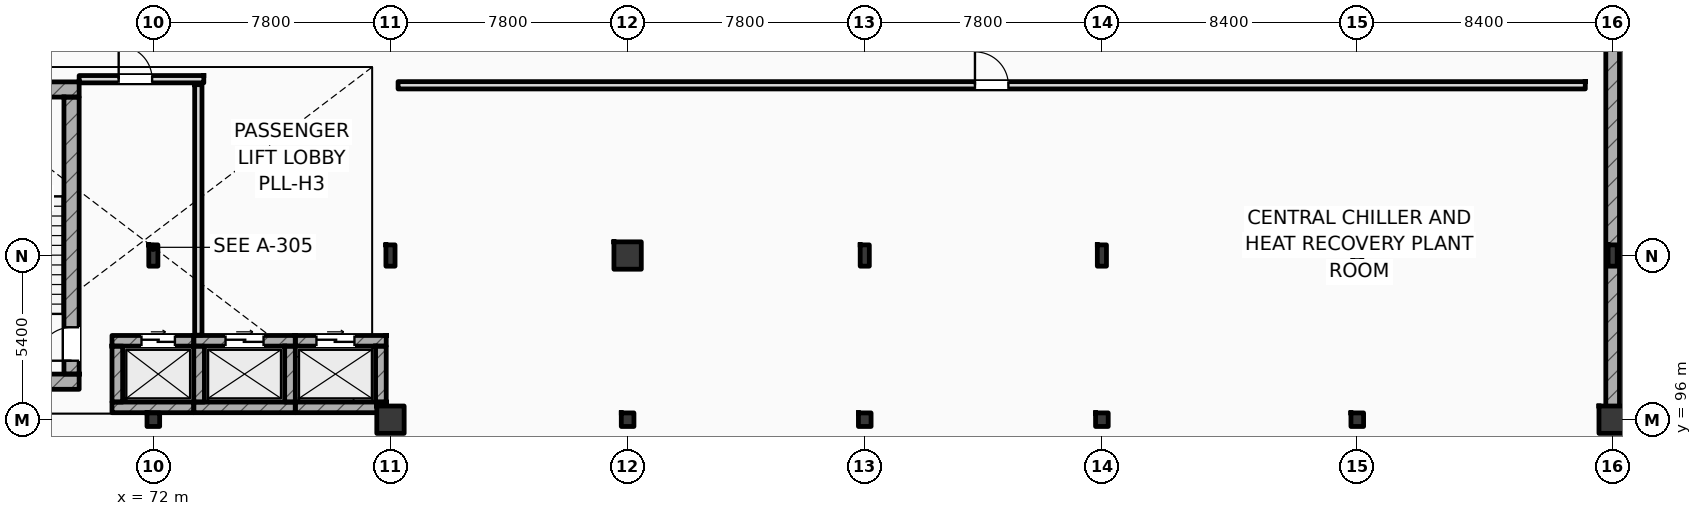
"""IFC4 building model, lengths in metres.
Left out: names, types, materials, properties, quantities, classifications, styles, units other than length and angle.
Written with IfcOpenShell. Run it as: python <this file> out.ifc"""

import sys

from ifc_helpers import new_model, si_unit, direction, frame, frame_2d, origin, origin_2d, place, context, subcontext, project, spatial, rectangle, i_section, extrude, element, fill, save


model = new_model("IFC4")
c1 = context("Model", 3, precision=1e-05, world=origin(), true_north=direction((0.0, 1.0)))
c2 = subcontext(c1, "Body", "Model", "MODEL_VIEW")
j1 = project(units=[si_unit("LENGTHUNIT", "METRE"), si_unit("PLANEANGLEUNIT", "RADIAN")], contexts=[c1])
p1 = place(None, origin())
s1 = spatial("IfcSite", under=j1, at=p1, CompositionType="ELEMENT")
p2 = place(p1, origin())
s2 = spatial("IfcBuilding", under=s1, at=p2, CompositionType="ELEMENT")
p3 = place(p2, frame((0.0, 0.0, -4.5)))
s3 = spatial("IfcBuildingStorey", under=s2, at=p3, CompositionType="ELEMENT", Elevation=-4.5)
p4 = place(p3, frame((172.0, 96.0, 0.0), z_axis=(0.0, 0.0, 1.0), x_axis=(-1.0, 0.0, 0.0)))
e1 = element("IfcWall", 1, at=p4, inside=s3, PredefinedType="SOLIDWALL", context=c2, shape_type="SweptSolid", body=[
    extrude(rectangle(XDim=52.0, YDim=0.45, at=frame_2d((26.0, 0.0))), origin(), (0.0, 0.0, 1.0), 4.5),
])
p5 = place(p3, frame((120.0, 96.0, 0.0), z_axis=(0.0, 0.0, 1.0), x_axis=(0.0, 1.0, 0.0)))
e2 = element("IfcWall", 2, at=p5, inside=s3, PredefinedType="SOLIDWALL", context=c2, shape_type="SweptSolid", body=[
    extrude(rectangle(XDim=22.0, YDim=0.45, at=frame_2d((11.0, 0.0))), origin(), (0.0, 0.0, 1.0), 4.5),
])
p6 = place(p3, frame((72.0, 96.0, 0.0), z_axis=(0.0, 0.0, 1.0), x_axis=(1.0, 0.0, 0.0)))
e3 = element("IfcColumn", 3, at=p6, inside=s3, PredefinedType="COLUMN", context=c2, shape_type="SweptSolid", body=[
    extrude(i_section(OverallWidth=0.416, OverallDepth=0.446, WebThickness=0.036, FlangeThickness=0.048, FilletRadius=0.015, at=origin_2d()), origin(), (0.0, 0.0, 1.0), 4.5),
])
p7 = place(p3, frame((72.0, 101.4, 0.0), z_axis=(0.0, 0.0, 1.0), x_axis=(1.0, 0.0, 0.0)))
e4 = element("IfcColumn", 4, at=p7, inside=s3, PredefinedType="COLUMN", context=c2, shape_type="SweptSolid", body=[
    extrude(i_section(OverallWidth=0.3, OverallDepth=0.7, WebThickness=0.017, FlangeThickness=0.032, FilletRadius=0.027, at=origin_2d()), origin(), (0.0, 0.0, 1.0), 4.5),
])
p8 = place(p3, frame((79.8, 96.0, 0.0), z_axis=(0.0, 0.0, 1.0), x_axis=(1.0, 0.0, 0.0)))
e5 = element("IfcColumn", 5, at=p8, inside=s3, PredefinedType="COLUMN", context=c2, shape_type="SweptSolid", body=[
    extrude(rectangle(XDim=0.9, YDim=0.9, at=origin_2d()), origin(), (0.0, 0.0, 1.0), 4.5),
])
p9 = place(p3, frame((79.8, 101.4, 0.0), z_axis=(0.0, 0.0, 1.0), x_axis=(1.0, 0.0, 0.0)))
e6 = element("IfcColumn", 6, at=p9, inside=s3, PredefinedType="COLUMN", context=c2, shape_type="SweptSolid", body=[
    extrude(i_section(OverallWidth=0.3, OverallDepth=0.7, WebThickness=0.017, FlangeThickness=0.032, FilletRadius=0.027, at=origin_2d()), origin(), (0.0, 0.0, 1.0), 4.5),
])
p10 = place(p3, frame((87.6, 96.0, 0.0), z_axis=(0.0, 0.0, 1.0), x_axis=(1.0, 0.0, 0.0)))
e7 = element("IfcColumn", 7, at=p10, inside=s3, PredefinedType="COLUMN", context=c2, shape_type="SweptSolid", body=[
    extrude(i_section(OverallWidth=0.416, OverallDepth=0.446, WebThickness=0.036, FlangeThickness=0.048, FilletRadius=0.015, at=origin_2d()), origin(), (0.0, 0.0, 1.0), 4.5),
])
p11 = place(p3, frame((87.6, 101.4, 0.0), z_axis=(0.0, 0.0, 1.0), x_axis=(1.0, 0.0, 0.0)))
e8 = element("IfcColumn", 8, at=p11, inside=s3, PredefinedType="COLUMN", context=c2, shape_type="SweptSolid", body=[
    extrude(rectangle(XDim=0.9, YDim=0.9, at=origin_2d()), origin(), (0.0, 0.0, 1.0), 4.5),
])
p12 = place(p3, frame((95.4, 96.0, 0.0), z_axis=(0.0, 0.0, 1.0), x_axis=(1.0, 0.0, 0.0)))
e9 = element("IfcColumn", 9, at=p12, inside=s3, PredefinedType="COLUMN", context=c2, shape_type="SweptSolid", body=[
    extrude(i_section(OverallWidth=0.416, OverallDepth=0.446, WebThickness=0.036, FlangeThickness=0.048, FilletRadius=0.015, at=origin_2d()), origin(), (0.0, 0.0, 1.0), 4.5),
])
p13 = place(p3, frame((95.4, 101.4, 0.0), z_axis=(0.0, 0.0, 1.0), x_axis=(1.0, 0.0, 0.0)))
e10 = element("IfcColumn", 10, at=p13, inside=s3, PredefinedType="COLUMN", context=c2, shape_type="SweptSolid", body=[
    extrude(i_section(OverallWidth=0.3, OverallDepth=0.7, WebThickness=0.017, FlangeThickness=0.032, FilletRadius=0.027, at=origin_2d()), origin(), (0.0, 0.0, 1.0), 4.5),
])
p14 = place(p3, frame((103.2, 96.0, 0.0), z_axis=(0.0, 0.0, 1.0), x_axis=(1.0, 0.0, 0.0)))
e11 = element("IfcColumn", 11, at=p14, inside=s3, PredefinedType="COLUMN", context=c2, shape_type="SweptSolid", body=[
    extrude(i_section(OverallWidth=0.416, OverallDepth=0.446, WebThickness=0.036, FlangeThickness=0.048, FilletRadius=0.015, at=origin_2d()), origin(), (0.0, 0.0, 1.0), 4.5),
])
p15 = place(p3, frame((103.2, 101.4, 0.0), z_axis=(0.0, 0.0, 1.0), x_axis=(1.0, 0.0, 0.0)))
e12 = element("IfcColumn", 12, at=p15, inside=s3, PredefinedType="COLUMN", context=c2, shape_type="SweptSolid", body=[
    extrude(i_section(OverallWidth=0.3, OverallDepth=0.7, WebThickness=0.017, FlangeThickness=0.032, FilletRadius=0.027, at=origin_2d()), origin(), (0.0, 0.0, 1.0), 4.5),
])
p16 = place(p3, frame((111.6, 96.0, 0.0), z_axis=(0.0, 0.0, 1.0), x_axis=(1.0, 0.0, 0.0)))
e13 = element("IfcColumn", 13, at=p16, inside=s3, PredefinedType="COLUMN", context=c2, shape_type="SweptSolid", body=[
    extrude(i_section(OverallWidth=0.416, OverallDepth=0.446, WebThickness=0.036, FlangeThickness=0.048, FilletRadius=0.015, at=origin_2d()), origin(), (0.0, 0.0, 1.0), 4.5),
])
p17 = place(p3, frame((111.6, 101.4, 0.0), z_axis=(0.0, 0.0, 1.0), x_axis=(1.0, 0.0, 0.0)))
e14 = element("IfcColumn", 14, at=p17, inside=s3, PredefinedType="COLUMN", context=c2, shape_type="SweptSolid", body=[
    extrude(i_section(OverallWidth=0.3, OverallDepth=0.7, WebThickness=0.017, FlangeThickness=0.032, FilletRadius=0.027, at=origin_2d()), origin(), (0.0, 0.0, 1.0), 4.5),
])
p18 = place(p3, frame((120.0, 96.0, 0.0), z_axis=(0.0, 0.0, 1.0), x_axis=(1.0, 0.0, 0.0)))
e15 = element("IfcColumn", 15, at=p18, inside=s3, PredefinedType="COLUMN", context=c2, shape_type="SweptSolid", body=[
    extrude(rectangle(XDim=0.9, YDim=0.9, at=origin_2d()), origin(), (0.0, 0.0, 1.0), 4.5),
])
p19 = place(p3, frame((120.0, 101.4, 0.0), z_axis=(0.0, 0.0, 1.0), x_axis=(1.0, 0.0, 0.0)))
e16 = element("IfcColumn", 16, at=p19, inside=s3, PredefinedType="COLUMN", context=c2, shape_type="SweptSolid", body=[
    extrude(i_section(OverallWidth=0.3, OverallDepth=0.7, WebThickness=0.017, FlangeThickness=0.032, FilletRadius=0.027, at=origin_2d()), origin(), (0.0, 0.0, 1.0), 4.5),
])
for number, where, z_axis, x_axis in (
    (17, (64.4, 106.862, 0.0), (0.0, 0.0, 1.0), (1.0, 0.0, 0.0)),
    (18, (64.4, 97.25, 0.0), (0.0, 0.0, 1.0), (1.0, 0.0, 0.0)),
):
    element("IfcWall", number, at=place(p3, frame(where, z_axis=z_axis, x_axis=x_axis)), inside=s3, PredefinedType="SHEAR", context=c2, shape_type="SweptSolid", body=[
        extrude(rectangle(XDim=5.16, YDim=0.5, at=frame_2d((2.58, 0.0))), origin(), (0.0, 0.0, 1.0), 4.5),
    ])
p20 = place(p3, frame((69.31, 97.5, 0.0), z_axis=(0.0, 0.0, 1.0), x_axis=(0.0, 1.0, 0.0)))
e19 = element("IfcWall", 19, at=p20, inside=s3, PredefinedType="SHEAR", context=c2, shape_type="SweptSolid", body=[
    extrude(rectangle(XDim=9.112, YDim=0.5, at=frame_2d((4.556, 0.0))), origin(), (0.0, 0.0, 1.0), 4.5),
])
p21 = place(p20, frame((0.44, 0.0, 0.0)))
e20 = element("IfcOpeningElement", 20, at=p21, cuts=e19, PredefinedType="OPENING", context=c2, shape_type="SweptSolid", body=[
    extrude(rectangle(XDim=1.1, YDim=2.2, at=frame_2d((0.55, 1.1))), frame((0.0, 0.26, 0.0), z_axis=(0.0, -1.0, 0.0), x_axis=(1.0, 0.0, 0.0)), (0.0, 0.0, 1.0), 0.52),
])
p22 = place(p3, frame((70.64, 98.595, 0.0), z_axis=(0.0, 0.0, 1.0), x_axis=(1.0, 0.0, 0.0)))
e21 = element("IfcWall", 21, at=p22, inside=s3, PredefinedType="SHEAR", context=c2, shape_type="SweptSolid", body=[
    extrude(rectangle(XDim=2.69, YDim=0.35, at=frame_2d((1.345, 0.0))), origin(), (0.0, 0.0, 1.0), 4.1),
])
p23 = place(p22, frame((0.97, 0.0, 0.0)))
e22 = element("IfcOpeningElement", 22, at=p23, cuts=e21, PredefinedType="OPENING", context=c2, shape_type="SweptSolid", body=[
    extrude(rectangle(XDim=1.1, YDim=2.2, at=frame_2d((0.55, 1.1))), frame((0.0, 0.185, 0.0), z_axis=(0.0, -1.0, 0.0), x_axis=(1.0, 0.0, 0.0)), (0.0, 0.0, 1.0), 0.37),
])
p24 = place(p3, frame((70.64, 96.405, 0.0), z_axis=(0.0, 0.0, 1.0), x_axis=(1.0, 0.0, 0.0)))
e23 = element("IfcWall", 23, at=p24, inside=s3, PredefinedType="SHEAR", context=c2, shape_type="SweptSolid", body=[
    extrude(rectangle(XDim=2.69, YDim=0.35, at=frame_2d((1.345, 0.0))), origin(), (0.0, 0.0, 1.0), 4.1),
])
p25 = place(p3, frame((70.815, 96.58, 0.0), z_axis=(0.0, 0.0, 1.0), x_axis=(0.0, 1.0, 0.0)))
e24 = element("IfcWall", 24, at=p25, inside=s3, PredefinedType="SHEAR", context=c2, shape_type="SweptSolid", body=[
    extrude(rectangle(XDim=1.84, YDim=0.35, at=frame_2d((0.92, 0.0))), origin(), (0.0, 0.0, 1.0), 4.1),
])
p26 = place(p3, frame((73.33, 98.595, 0.0), z_axis=(0.0, 0.0, 1.0), x_axis=(1.0, 0.0, 0.0)))
e25 = element("IfcWall", 25, at=p26, inside=s3, PredefinedType="SHEAR", context=c2, shape_type="SweptSolid", body=[
    extrude(rectangle(XDim=3.34, YDim=0.35, at=frame_2d((1.67, 0.0))), origin(), (0.0, 0.0, 1.0), 4.1),
])
p27 = place(p26, frame((1.045, 0.0, 0.0)))
e26 = element("IfcOpeningElement", 26, at=p27, cuts=e25, PredefinedType="OPENING", context=c2, shape_type="SweptSolid", body=[
    extrude(rectangle(XDim=1.25, YDim=2.25, at=frame_2d((0.625, 1.125))), frame((0.0, 0.185, 0.0), z_axis=(0.0, -1.0, 0.0), x_axis=(1.0, 0.0, 0.0)), (0.0, 0.0, 1.0), 0.37),
])
p28 = place(p3, frame((73.33, 96.405, 0.0), z_axis=(0.0, 0.0, 1.0), x_axis=(1.0, 0.0, 0.0)))
e27 = element("IfcWall", 27, at=p28, inside=s3, PredefinedType="SHEAR", context=c2, shape_type="SweptSolid", body=[
    extrude(rectangle(XDim=3.34, YDim=0.35, at=frame_2d((1.67, 0.0))), origin(), (0.0, 0.0, 1.0), 4.1),
])
for number, where, z_axis, x_axis in (
    (28, (73.505, 96.58, 0.0), (0.0, 0.0, 1.0), (0.0, 1.0, 0.0)),
    (29, (76.495, 96.58, 0.0), (0.0, 0.0, 1.0), (0.0, 1.0, 0.0)),
):
    element("IfcWall", number, at=place(p3, frame(where, z_axis=z_axis, x_axis=x_axis)), inside=s3, PredefinedType="SHEAR", context=c2, shape_type="SweptSolid", body=[
        extrude(rectangle(XDim=1.84, YDim=0.35, at=frame_2d((0.92, 0.0))), origin(), (0.0, 0.0, 1.0), 4.1),
    ])
p29 = place(p3, frame((76.67, 98.595, 0.0), z_axis=(0.0, 0.0, 1.0), x_axis=(1.0, 0.0, 0.0)))
e30 = element("IfcWall", 30, at=p29, inside=s3, PredefinedType="SHEAR", context=c2, shape_type="SweptSolid", body=[
    extrude(rectangle(XDim=2.99, YDim=0.35, at=frame_2d((1.495, 0.0))), origin(), (0.0, 0.0, 1.0), 4.1),
])
p30 = place(p29, frame((0.695, 0.0, 0.0)))
e31 = element("IfcOpeningElement", 31, at=p30, cuts=e30, PredefinedType="OPENING", context=c2, shape_type="SweptSolid", body=[
    extrude(rectangle(XDim=1.25, YDim=2.25, at=frame_2d((0.625, 1.125))), frame((0.0, 0.185, 0.0), z_axis=(0.0, -1.0, 0.0), x_axis=(1.0, 0.0, 0.0)), (0.0, 0.0, 1.0), 0.37),
])
p31 = place(p3, frame((76.67, 96.405, 0.0), z_axis=(0.0, 0.0, 1.0), x_axis=(1.0, 0.0, 0.0)))
e32 = element("IfcWall", 32, at=p31, inside=s3, PredefinedType="SHEAR", context=c2, shape_type="SweptSolid", body=[
    extrude(rectangle(XDim=2.99, YDim=0.35, at=frame_2d((1.495, 0.0))), origin(), (0.0, 0.0, 1.0), 4.1),
])
p32 = place(p3, frame((79.485, 96.58, 0.0), z_axis=(0.0, 0.0, 1.0), x_axis=(0.0, 1.0, 0.0)))
e33 = element("IfcWall", 33, at=p32, inside=s3, PredefinedType="SHEAR", context=c2, shape_type="SweptSolid", body=[
    extrude(rectangle(XDim=1.84, YDim=0.35, at=frame_2d((0.92, 0.0))), origin(), (0.0, 0.0, 1.0), 3.64),
])
p33 = place(p3, frame((73.48, 98.78, 0.0), z_axis=(0.0, 0.0, 1.0), x_axis=(0.0, 1.0, 0.0)))
e34 = element("IfcWall", 34, at=p33, inside=s3, PredefinedType="STANDARD", context=c2, shape_type="SweptSolid", body=[
    extrude(rectangle(XDim=8.24, YDim=0.24, at=frame_2d((4.12, 0.0))), origin(), (0.0, 0.0, 1.0), 4.1),
])
p34 = place(p3, frame((69.56, 107.2, 0.0), z_axis=(0.0, 0.0, 1.0), x_axis=(1.0, 0.0, 0.0)))
e35 = element("IfcWall", 35, at=p34, inside=s3, PredefinedType="STANDARD", context=c2, shape_type="SweptSolid", body=[
    extrude(rectangle(XDim=4.1, YDim=0.24, at=frame_2d((2.05, 0.0))), origin(), (0.0, 0.0, 1.0), 4.1),
])
p35 = place(p34, frame((1.3, 0.0, 0.0)))
e36 = element("IfcOpeningElement", 36, at=p35, cuts=e35, PredefinedType="OPENING", context=c2, shape_type="SweptSolid", body=[
    extrude(rectangle(XDim=1.1, YDim=2.2, at=frame_2d((0.55, 1.1))), frame((0.0, 0.13, 0.0), z_axis=(0.0, -1.0, 0.0), x_axis=(1.0, 0.0, 0.0)), (0.0, 0.0, 1.0), 0.26),
])
p36 = place(p3, frame((80.05, 107.0, 0.0), z_axis=(0.0, 0.0, 1.0), x_axis=(1.0, 0.0, 0.0)))
e37 = element("IfcWall", 37, at=p36, inside=s3, PredefinedType="STANDARD", context=c2, shape_type="SweptSolid", body=[
    extrude(rectangle(XDim=39.05, YDim=0.24, at=frame_2d((19.525, 0.0))), origin(), (0.0, 0.0, 1.0), 4.1),
])
p37 = place(p36, frame((18.975, 0.0, 0.0)))
e38 = element("IfcOpeningElement", 38, at=p37, cuts=e37, PredefinedType="OPENING", context=c2, shape_type="SweptSolid", body=[
    extrude(rectangle(XDim=1.1, YDim=2.2, at=frame_2d((0.55, 1.1))), frame((0.0, 0.13, 0.0), z_axis=(0.0, -1.0, 0.0), x_axis=(1.0, 0.0, 0.0)), (0.0, 0.0, 1.0), 0.26),
])
p38 = place(p21, origin())
e39 = element("IfcDoor", 39, at=p38, inside=s3, OperationType="SINGLE_SWING_LEFT", PredefinedType="DOOR", context=c2, shape_type="SweptSolid", body=[
    extrude(rectangle(XDim=1.1, YDim=2.2, at=frame_2d((0.55, 1.1))), frame((0.0, 0.025, 0.0), z_axis=(0.0, -1.0, 0.0), x_axis=(1.0, 0.0, 0.0)), (0.0, 0.0, 1.0), 0.05),
])
fill(e20, e39)
p39 = place(p23, origin())
e40 = element("IfcDoor", 40, at=p39, inside=s3, OperationType="SLIDING_TO_LEFT", PredefinedType="DOOR", context=c2, shape_type="SweptSolid", body=[
    extrude(rectangle(XDim=1.1, YDim=2.2, at=frame_2d((0.55, 1.1))), frame((0.0, 0.025, 0.0), z_axis=(0.0, -1.0, 0.0), x_axis=(1.0, 0.0, 0.0)), (0.0, 0.0, 1.0), 0.05),
])
fill(e22, e40)
p40 = place(p27, origin())
e41 = element("IfcDoor", 41, at=p40, inside=s3, OperationType="SLIDING_TO_LEFT", PredefinedType="DOOR", context=c2, shape_type="SweptSolid", body=[
    extrude(rectangle(XDim=1.25, YDim=2.25, at=frame_2d((0.625, 1.125))), frame((0.0, 0.025, 0.0), z_axis=(0.0, -1.0, 0.0), x_axis=(1.0, 0.0, 0.0)), (0.0, 0.0, 1.0), 0.05),
])
fill(e26, e41)
p41 = place(p30, origin())
e42 = element("IfcDoor", 42, at=p41, inside=s3, OperationType="SLIDING_TO_LEFT", PredefinedType="DOOR", context=c2, shape_type="SweptSolid", body=[
    extrude(rectangle(XDim=1.25, YDim=2.25, at=frame_2d((0.625, 1.125))), frame((0.0, 0.025, 0.0), z_axis=(0.0, -1.0, 0.0), x_axis=(1.0, 0.0, 0.0)), (0.0, 0.0, 1.0), 0.05),
])
fill(e31, e42)
p42 = place(p35, origin())
e43 = element("IfcDoor", 43, at=p42, inside=s3, OperationType="SINGLE_SWING_LEFT", PredefinedType="DOOR", context=c2, shape_type="SweptSolid", body=[
    extrude(rectangle(XDim=1.1, YDim=2.2, at=frame_2d((0.55, 1.1))), frame((0.0, 0.025, 0.0), z_axis=(0.0, -1.0, 0.0), x_axis=(1.0, 0.0, 0.0)), (0.0, 0.0, 1.0), 0.05),
])
fill(e36, e43)
p43 = place(p37, origin())
e44 = element("IfcDoor", 44, at=p43, inside=s3, OperationType="SINGLE_SWING_LEFT", PredefinedType="DOOR", context=c2, shape_type="SweptSolid", body=[
    extrude(rectangle(XDim=1.1, YDim=2.2, at=frame_2d((0.55, 1.1))), frame((0.0, 0.025, 0.0), z_axis=(0.0, -1.0, 0.0), x_axis=(1.0, 0.0, 0.0)), (0.0, 0.0, 1.0), 0.05),
])
fill(e38, e44)
save(model, sys.argv[1])
